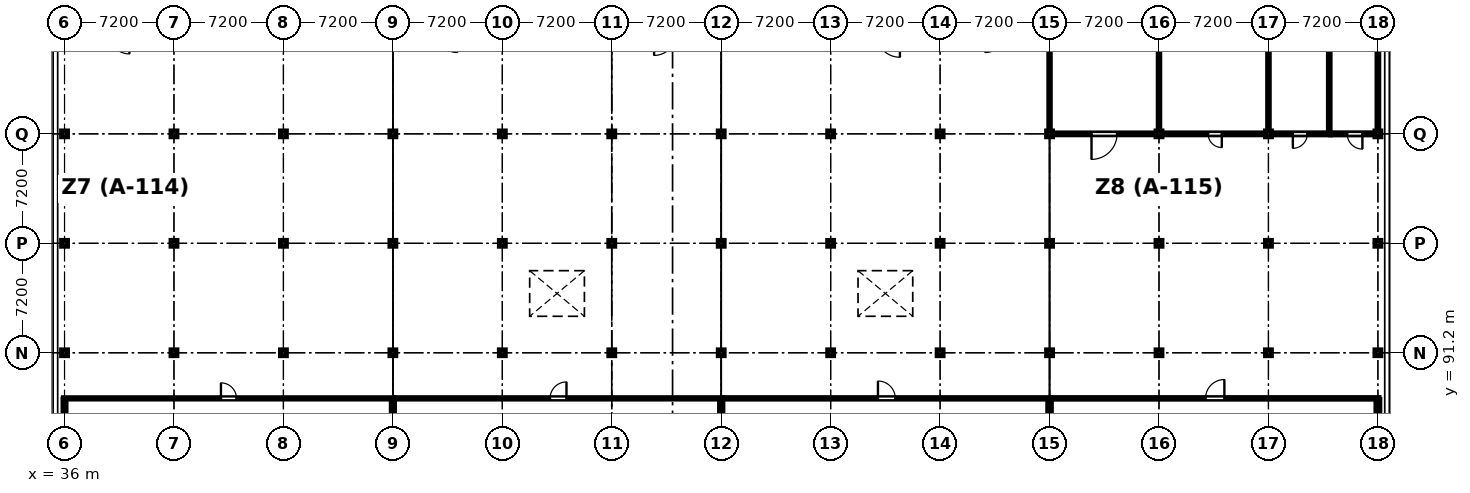
"""IFC4 building model, lengths in metres.
Left out: names, types, materials, properties, quantities, classifications, styles, units other than length and angle.
Written with IfcOpenShell. Run it as: python <this file> out.ifc"""

import sys

from ifc_helpers import new_model, si_unit, direction, frame, frame_2d, origin, origin_2d, place, context, subcontext, project, spatial, rectangle, i_section, extrude, element, fill, save


model = new_model("IFC4")
c1 = context("Model", 3, precision=1e-05, world=origin(), true_north=direction((0.0, 1.0)))
c2 = subcontext(c1, "Body", "Model", "MODEL_VIEW")
j1 = project(units=[si_unit("LENGTHUNIT", "METRE"), si_unit("PLANEANGLEUNIT", "RADIAN")], contexts=[c1])
p1 = place(None, origin())
s1 = spatial("IfcSite", under=j1, at=p1, CompositionType="ELEMENT")
p2 = place(p1, origin())
s2 = spatial("IfcBuilding", under=s1, at=p2, CompositionType="ELEMENT")
p3 = place(p2, origin())
s3 = spatial("IfcBuildingStorey", under=s2, at=p3, CompositionType="ELEMENT", Elevation=0.0)
for number, where, z_axis, x_axis in (
    (1, (36.0, 91.2, 0.0), (0.0, 0.0, 1.0), (1.0, 0.0, 0.0)),
    (2, (36.0, 98.4, 0.0), (0.0, 0.0, 1.0), (1.0, 0.0, 0.0)),
    (3, (36.0, 105.6, 0.0), (0.0, 0.0, 1.0), (1.0, 0.0, 0.0)),
    (4, (43.2, 91.2, 0.0), (0.0, 0.0, 1.0), (1.0, 0.0, 0.0)),
    (5, (43.2, 98.4, 0.0), (0.0, 0.0, 1.0), (1.0, 0.0, 0.0)),
    (6, (43.2, 105.6, 0.0), (0.0, 0.0, 1.0), (1.0, 0.0, 0.0)),
    (7, (50.4, 91.2, 0.0), (0.0, 0.0, 1.0), (1.0, 0.0, 0.0)),
    (8, (50.4, 98.4, 0.0), (0.0, 0.0, 1.0), (1.0, 0.0, 0.0)),
    (9, (50.4, 105.6, 0.0), (0.0, 0.0, 1.0), (1.0, 0.0, 0.0)),
    (10, (57.6, 91.2, 0.0), (0.0, 0.0, 1.0), (1.0, 0.0, 0.0)),
    (11, (57.6, 98.4, 0.0), (0.0, 0.0, 1.0), (1.0, 0.0, 0.0)),
    (12, (57.6, 105.6, 0.0), (0.0, 0.0, 1.0), (1.0, 0.0, 0.0)),
    (13, (64.8, 91.2, 0.0), (0.0, 0.0, 1.0), (1.0, 0.0, 0.0)),
    (14, (64.8, 98.4, 0.0), (0.0, 0.0, 1.0), (1.0, 0.0, 0.0)),
    (15, (64.8, 105.6, 0.0), (0.0, 0.0, 1.0), (1.0, 0.0, 0.0)),
    (16, (72.0, 91.2, 0.0), (0.0, 0.0, 1.0), (1.0, 0.0, 0.0)),
    (17, (72.0, 98.4, 0.0), (0.0, 0.0, 1.0), (1.0, 0.0, 0.0)),
    (18, (72.0, 105.6, 0.0), (0.0, 0.0, 1.0), (1.0, 0.0, 0.0)),
    (19, (79.2, 91.2, 0.0), (0.0, 0.0, 1.0), (1.0, 0.0, 0.0)),
    (20, (79.2, 98.4, 0.0), (0.0, 0.0, 1.0), (1.0, 0.0, 0.0)),
    (21, (79.2, 105.6, 0.0), (0.0, 0.0, 1.0), (1.0, 0.0, 0.0)),
    (22, (86.4, 91.2, 0.0), (0.0, 0.0, 1.0), (1.0, 0.0, 0.0)),
    (23, (86.4, 98.4, 0.0), (0.0, 0.0, 1.0), (1.0, 0.0, 0.0)),
    (24, (86.4, 105.6, 0.0), (0.0, 0.0, 1.0), (1.0, 0.0, 0.0)),
    (25, (93.6, 91.2, 0.0), (0.0, 0.0, 1.0), (1.0, 0.0, 0.0)),
    (26, (93.6, 98.4, 0.0), (0.0, 0.0, 1.0), (1.0, 0.0, 0.0)),
    (27, (93.6, 105.6, 0.0), (0.0, 0.0, 1.0), (1.0, 0.0, 0.0)),
    (28, (100.8, 91.2, 0.0), (0.0, 0.0, 1.0), (1.0, 0.0, 0.0)),
    (29, (100.8, 98.4, 0.0), (0.0, 0.0, 1.0), (1.0, 0.0, 0.0)),
    (30, (100.8, 105.6, 0.0), (0.0, 0.0, 1.0), (1.0, 0.0, 0.0)),
    (31, (108.0, 91.2, 0.0), (0.0, 0.0, 1.0), (1.0, 0.0, 0.0)),
    (32, (108.0, 98.4, 0.0), (0.0, 0.0, 1.0), (1.0, 0.0, 0.0)),
    (33, (108.0, 105.6, 0.0), (0.0, 0.0, 1.0), (1.0, 0.0, 0.0)),
    (34, (115.2, 91.2, 0.0), (0.0, 0.0, 1.0), (1.0, 0.0, 0.0)),
    (35, (115.2, 98.4, 0.0), (0.0, 0.0, 1.0), (1.0, 0.0, 0.0)),
    (36, (115.2, 105.6, 0.0), (0.0, 0.0, 1.0), (1.0, 0.0, 0.0)),
    (37, (122.4, 91.2, 0.0), (0.0, 0.0, 1.0), (1.0, 0.0, 0.0)),
    (38, (122.4, 98.4, 0.0), (0.0, 0.0, 1.0), (1.0, 0.0, 0.0)),
    (39, (122.4, 105.6, 0.0), (0.0, 0.0, 1.0), (1.0, 0.0, 0.0)),
):
    element("IfcColumn", number, at=place(p3, frame(where, z_axis=z_axis, x_axis=x_axis)), inside=s3, PredefinedType="COLUMN", context=c2, shape_type="SweptSolid", body=[
        extrude(i_section(OverallWidth=0.399, OverallDepth=0.394, WebThickness=0.023, FlangeThickness=0.037, FilletRadius=0.015, at=origin_2d()), origin(), (0.0, 0.0, 1.0), 5.4),
    ])
p4 = place(p3, frame((35.92, 88.2, 0.0), z_axis=(0.0, 0.0, 1.0), x_axis=(1.0, 0.0, 0.0)))
e40 = element("IfcWall", 40, at=p4, inside=s3, PredefinedType="PARTITIONING", context=c2, shape_type="SweptSolid", body=[
    extrude(rectangle(XDim=21.76, YDim=0.1, at=frame_2d((10.88, 0.0))), origin(), (0.0, 0.0, 1.0), 4.457),
])
p5 = place(p4, frame((10.37, 0.0, 0.0)))
e41 = element("IfcOpeningElement", 41, at=p5, cuts=e40, PredefinedType="OPENING", context=c2, shape_type="SweptSolid", body=[
    extrude(rectangle(XDim=1.02, YDim=2.16, at=frame_2d((0.51, 1.08))), frame((0.0, 0.06, 0.0), z_axis=(0.0, -1.0, 0.0), x_axis=(1.0, 0.0, 0.0)), (0.0, 0.0, 1.0), 0.12),
])
p6 = place(p4, frame((12.64, 0.0, 0.95)))
e42 = element("IfcOpeningElement", 42, at=p6, cuts=e40, PredefinedType="OPENING", context=c2, shape_type="SweptSolid", body=[
    extrude(rectangle(XDim=1.6, YDim=1.0, at=frame_2d((0.8, 0.5))), frame((0.0, 0.06, 0.0), z_axis=(0.0, -1.0, 0.0), x_axis=(1.0, 0.0, 0.0)), (0.0, 0.0, 1.0), 0.12),
])
p7 = place(p3, frame((57.682, 88.2, 0.0), z_axis=(0.0, 0.0, 1.0), x_axis=(1.0, 0.0, 0.0)))
e43 = element("IfcWall", 43, at=p7, inside=s3, PredefinedType="PARTITIONING", context=c2, shape_type="SweptSolid", body=[
    extrude(rectangle(XDim=21.598, YDim=0.105, at=frame_2d((10.799, 0.0))), origin(), (0.0, 0.0, 1.0), 4.457),
])
p8 = place(p7, frame((10.259, 0.0, 0.0)))
e44 = element("IfcOpeningElement", 44, at=p8, cuts=e43, PredefinedType="OPENING", context=c2, shape_type="SweptSolid", body=[
    extrude(rectangle(XDim=1.08, YDim=2.16, at=frame_2d((0.54, 1.08))), frame((0.0, 0.062, 0.0), z_axis=(0.0, -1.0, 0.0), x_axis=(1.0, 0.0, 0.0)), (0.0, 0.0, 1.0), 0.125),
])
p9 = place(p7, frame((12.589, 0.0, 0.95)))
e45 = element("IfcOpeningElement", 45, at=p9, cuts=e43, PredefinedType="OPENING", context=c2, shape_type="SweptSolid", body=[
    extrude(rectangle(XDim=1.0, YDim=1.15, at=frame_2d((0.5, 0.575))), frame((0.0, 0.062, 0.0), z_axis=(0.0, -1.0, 0.0), x_axis=(1.0, 0.0, 0.0)), (0.0, 0.0, 1.0), 0.125),
])
p10 = place(p3, frame((79.282, 88.2, 0.0), z_axis=(0.0, 0.0, 1.0), x_axis=(1.0, 0.0, 0.0)))
e46 = element("IfcWall", 46, at=p10, inside=s3, PredefinedType="PARTITIONING", context=c2, shape_type="SweptSolid", body=[
    extrude(rectangle(XDim=21.598, YDim=0.11, at=frame_2d((10.799, 0.0))), origin(), (0.0, 0.0, 1.0), 4.457),
])
p11 = place(p10, frame((10.229, 0.0, 0.0)))
e47 = element("IfcOpeningElement", 47, at=p11, cuts=e46, PredefinedType="OPENING", context=c2, shape_type="SweptSolid", body=[
    extrude(rectangle(XDim=1.14, YDim=2.16, at=frame_2d((0.57, 1.08))), frame((0.0, 0.065, 0.0), z_axis=(0.0, -1.0, 0.0), x_axis=(1.0, 0.0, 0.0)), (0.0, 0.0, 1.0), 0.13),
])
p12 = place(p10, frame((12.619, 0.0, 0.95)))
e48 = element("IfcOpeningElement", 48, at=p12, cuts=e46, PredefinedType="OPENING", context=c2, shape_type="SweptSolid", body=[
    extrude(rectangle(XDim=1.25, YDim=1.15, at=frame_2d((0.625, 0.575))), frame((0.0, 0.065, 0.0), z_axis=(0.0, -1.0, 0.0), x_axis=(1.0, 0.0, 0.0)), (0.0, 0.0, 1.0), 0.13),
])
p13 = place(p3, frame((100.882, 88.2, 0.0), z_axis=(0.0, 0.0, 1.0), x_axis=(1.0, 0.0, 0.0)))
e49 = element("IfcWall", 49, at=p13, inside=s3, PredefinedType="PARTITIONING", context=c2, shape_type="SweptSolid", body=[
    extrude(rectangle(XDim=21.598, YDim=0.115, at=frame_2d((10.799, 0.0))), origin(), (0.0, 0.0, 1.0), 4.457),
])
p14 = place(p13, frame((10.179, 0.0, 0.0)))
e50 = element("IfcOpeningElement", 50, at=p14, cuts=e49, PredefinedType="OPENING", context=c2, shape_type="SweptSolid", body=[
    extrude(rectangle(XDim=1.24, YDim=2.16, at=frame_2d((0.62, 1.08))), frame((0.0, 0.067, 0.0), z_axis=(0.0, -1.0, 0.0), x_axis=(1.0, 0.0, 0.0)), (0.0, 0.0, 1.0), 0.135),
])
p15 = place(p13, frame((12.669, 0.0, 0.95)))
e51 = element("IfcOpeningElement", 51, at=p15, cuts=e49, PredefinedType="OPENING", context=c2, shape_type="SweptSolid", body=[
    extrude(rectangle(XDim=1.5, YDim=1.15, at=frame_2d((0.75, 0.575))), frame((0.0, 0.067, 0.0), z_axis=(0.0, -1.0, 0.0), x_axis=(1.0, 0.0, 0.0)), (0.0, 0.0, 1.0), 0.135),
])
p16 = place(p3, frame((108.08, 105.6, 0.0), z_axis=(0.0, 0.0, 1.0), x_axis=(-1.0, 0.0, 0.0)))
e52 = element("IfcWall", 52, at=p16, inside=s3, PredefinedType="PARTITIONING", context=c2, shape_type="SweptSolid", body=[
    extrude(rectangle(XDim=7.36, YDim=0.135, at=frame_2d((3.68, 0.0))), origin(), (0.0, 0.0, 1.0), 4.457),
])
p17 = place(p16, frame((2.84, 0.0, 0.0)))
e53 = element("IfcOpeningElement", 53, at=p17, cuts=e52, PredefinedType="OPENING", context=c2, shape_type="SweptSolid", body=[
    extrude(rectangle(XDim=1.68, YDim=2.16, at=frame_2d((0.84, 1.08))), frame((0.0, 0.077, 0.0), z_axis=(0.0, -1.0, 0.0), x_axis=(1.0, 0.0, 0.0)), (0.0, 0.0, 1.0), 0.155),
])
p18 = place(p3, frame((115.28, 105.6, 0.0), z_axis=(0.0, 0.0, 1.0), x_axis=(-1.0, 0.0, 0.0)))
e54 = element("IfcWall", 54, at=p18, inside=s3, PredefinedType="PARTITIONING", context=c2, shape_type="SweptSolid", body=[
    extrude(rectangle(XDim=7.198, YDim=0.14, at=frame_2d((3.599, 0.0))), origin(), (0.0, 0.0, 1.0), 4.457),
])
p19 = place(p18, frame((3.149, 0.0, 0.0)))
e55 = element("IfcOpeningElement", 55, at=p19, cuts=e54, PredefinedType="OPENING", context=c2, shape_type="SweptSolid", body=[
    extrude(rectangle(XDim=0.9, YDim=2.22, at=frame_2d((0.45, 1.11))), frame((0.0, 0.08, 0.0), z_axis=(0.0, -1.0, 0.0), x_axis=(1.0, 0.0, 0.0)), (0.0, 0.0, 1.0), 0.16),
])
p20 = place(p3, frame((119.28, 105.6, 0.0), z_axis=(0.0, 0.0, 1.0), x_axis=(-1.0, 0.0, 0.0)))
e56 = element("IfcWall", 56, at=p20, inside=s3, PredefinedType="PARTITIONING", context=c2, shape_type="SweptSolid", body=[
    extrude(rectangle(XDim=3.998, YDim=0.145, at=frame_2d((1.999, 0.0))), origin(), (0.0, 0.0, 1.0), 4.457),
])
p21 = place(p20, frame((1.524, 0.0, 0.0)))
e57 = element("IfcOpeningElement", 57, at=p21, cuts=e56, PredefinedType="OPENING", context=c2, shape_type="SweptSolid", body=[
    extrude(rectangle(XDim=0.95, YDim=2.22, at=frame_2d((0.475, 1.11))), frame((0.0, 0.083, 0.0), z_axis=(0.0, -1.0, 0.0), x_axis=(1.0, 0.0, 0.0)), (0.0, 0.0, 1.0), 0.165),
])
p22 = place(p3, frame((122.48, 105.6, 0.0), z_axis=(0.0, 0.0, 1.0), x_axis=(-1.0, 0.0, 0.0)))
e58 = element("IfcWall", 58, at=p22, inside=s3, PredefinedType="PARTITIONING", context=c2, shape_type="SweptSolid", body=[
    extrude(rectangle(XDim=3.198, YDim=0.15, at=frame_2d((1.599, 0.0))), origin(), (0.0, 0.0, 1.0), 4.457),
])
p23 = place(p22, frame((1.099, 0.0, 0.0)))
e59 = element("IfcOpeningElement", 59, at=p23, cuts=e58, PredefinedType="OPENING", context=c2, shape_type="SweptSolid", body=[
    extrude(rectangle(XDim=1.0, YDim=2.22, at=frame_2d((0.5, 1.11))), frame((0.0, 0.085, 0.0), z_axis=(0.0, -1.0, 0.0), x_axis=(1.0, 0.0, 0.0)), (0.0, 0.0, 1.0), 0.17),
])
p24 = place(p3, frame((36.0, 76.942, 0.0), z_axis=(0.0, 0.0, 1.0), x_axis=(0.0, 1.0, 0.0)))
e60 = element("IfcWall", 60, at=p24, inside=s3, PredefinedType="PARTITIONING", context=c2, shape_type="SweptSolid", body=[
    extrude(rectangle(XDim=11.206, YDim=0.212, at=frame_2d((5.603, 0.0))), origin(), (0.0, 0.0, 1.0), 4.457),
])
p25 = place(p3, frame((57.6, 88.146, 0.0), z_axis=(0.0, 0.0, 1.0), x_axis=(0.0, -1.0, 0.0)))
e61 = element("IfcWall", 61, at=p25, inside=s3, PredefinedType="PARTITIONING", context=c2, shape_type="SweptSolid", body=[
    extrude(rectangle(XDim=11.204, YDim=0.225, at=frame_2d((5.602, 0.0))), origin(), (0.0, 0.0, 1.0), 4.457),
])
p26 = place(p3, frame((79.2, 88.143, 0.0), z_axis=(0.0, 0.0, 1.0), x_axis=(0.0, -1.0, 0.0)))
e62 = element("IfcWall", 62, at=p26, inside=s3, PredefinedType="PARTITIONING", context=c2, shape_type="SweptSolid", body=[
    extrude(rectangle(XDim=11.201, YDim=0.235, at=frame_2d((5.601, 0.0))), origin(), (0.0, 0.0, 1.0), 4.457),
])
p27 = place(p3, frame((100.8, 88.14, 0.0), z_axis=(0.0, 0.0, 1.0), x_axis=(0.0, -1.0, 0.0)))
e63 = element("IfcWall", 63, at=p27, inside=s3, PredefinedType="PARTITIONING", context=c2, shape_type="SweptSolid", body=[
    extrude(rectangle(XDim=11.198, YDim=0.25, at=frame_2d((5.599, 0.0))), origin(), (0.0, 0.0, 1.0), 4.457),
])
p28 = place(p3, frame((122.4, 88.14, 0.0), z_axis=(0.0, 0.0, 1.0), x_axis=(0.0, -1.0, 0.0)))
e64 = element("IfcWall", 64, at=p28, inside=s3, PredefinedType="PARTITIONING", context=c2, shape_type="SweptSolid", body=[
    extrude(rectangle(XDim=11.198, YDim=0.27, at=frame_2d((5.599, 0.0))), origin(), (0.0, 0.0, 1.0), 4.457),
])
p29 = place(p3, frame((100.8, 105.67, 0.0), z_axis=(0.0, 0.0, 1.0), x_axis=(0.0, 1.0, 0.0)))
e65 = element("IfcWall", 65, at=p29, inside=s3, PredefinedType="PARTITIONING", context=c2, shape_type="SweptSolid", body=[
    extrude(rectangle(XDim=6.446, YDim=0.11, at=frame_2d((3.223, 0.0))), origin(), (0.0, 0.0, 1.0), 4.457),
])
p30 = place(p3, frame((108.0, 112.113, 0.0), z_axis=(0.0, 0.0, 1.0), x_axis=(0.0, -1.0, 0.0)))
e66 = element("IfcWall", 66, at=p30, inside=s3, PredefinedType="PARTITIONING", context=c2, shape_type="SweptSolid", body=[
    extrude(rectangle(XDim=6.441, YDim=0.115, at=frame_2d((3.22, 0.0))), origin(), (0.0, 0.0, 1.0), 4.457),
])
p31 = place(p3, frame((115.2, 112.109, 0.0), z_axis=(0.0, 0.0, 1.0), x_axis=(0.0, -1.0, 0.0)))
e67 = element("IfcWall", 67, at=p31, inside=s3, PredefinedType="PARTITIONING", context=c2, shape_type="SweptSolid", body=[
    extrude(rectangle(XDim=6.435, YDim=0.12, at=frame_2d((3.217, 0.0))), origin(), (0.0, 0.0, 1.0), 4.457),
])
p32 = place(p3, frame((119.2, 112.106, 0.0), z_axis=(0.0, 0.0, 1.0), x_axis=(0.0, -1.0, 0.0)))
e68 = element("IfcWall", 68, at=p32, inside=s3, PredefinedType="PARTITIONING", context=c2, shape_type="SweptSolid", body=[
    extrude(rectangle(XDim=6.429, YDim=0.125, at=frame_2d((3.214, 0.0))), origin(), (0.0, 0.0, 1.0), 4.457),
])
p33 = place(p3, frame((122.4, 112.106, 0.0), z_axis=(0.0, 0.0, 1.0), x_axis=(0.0, -1.0, 0.0)))
e69 = element("IfcWall", 69, at=p33, inside=s3, PredefinedType="PARTITIONING", context=c2, shape_type="SweptSolid", body=[
    extrude(rectangle(XDim=6.429, YDim=0.13, at=frame_2d((3.214, 0.0))), origin(), (0.0, 0.0, 1.0), 4.457),
])
p34 = place(p5, origin())
e70 = element("IfcDoor", 70, at=p34, inside=s3, OperationType="SINGLE_SWING_LEFT", PredefinedType="DOOR", context=c2, shape_type="SweptSolid", body=[
    extrude(rectangle(XDim=1.02, YDim=2.16, at=frame_2d((0.51, 1.08))), frame((0.0, 0.025, 0.0), z_axis=(0.0, -1.0, 0.0), x_axis=(1.0, 0.0, 0.0)), (0.0, 0.0, 1.0), 0.05),
])
fill(e41, e70)
p35 = place(p6, origin())
e71 = element("IfcWindow", 71, at=p35, inside=s3, PartitioningType="SINGLE_PANEL", PredefinedType="WINDOW", context=c2, shape_type="SweptSolid", body=[
    extrude(rectangle(XDim=1.6, YDim=1.0, at=frame_2d((0.8, 0.5))), frame((0.0, 0.03, 0.0), z_axis=(0.0, -1.0, 0.0), x_axis=(1.0, 0.0, 0.0)), (0.0, 0.0, 1.0), 0.06),
])
fill(e42, e71)
p36 = place(p8, origin())
e72 = element("IfcDoor", 72, at=p36, inside=s3, OperationType="SINGLE_SWING_RIGHT", PredefinedType="DOOR", context=c2, shape_type="SweptSolid", body=[
    extrude(rectangle(XDim=1.08, YDim=2.16, at=frame_2d((0.54, 1.08))), frame((0.0, 0.025, 0.0), z_axis=(0.0, -1.0, 0.0), x_axis=(1.0, 0.0, 0.0)), (0.0, 0.0, 1.0), 0.05),
])
fill(e44, e72)
p37 = place(p9, origin())
e73 = element("IfcWindow", 73, at=p37, inside=s3, PartitioningType="SINGLE_PANEL", PredefinedType="WINDOW", context=c2, shape_type="SweptSolid", body=[
    extrude(rectangle(XDim=1.0, YDim=1.15, at=frame_2d((0.5, 0.575))), frame((0.0, 0.03, 0.0), z_axis=(0.0, -1.0, 0.0), x_axis=(1.0, 0.0, 0.0)), (0.0, 0.0, 1.0), 0.06),
])
fill(e45, e73)
p38 = place(p11, origin())
e74 = element("IfcDoor", 74, at=p38, inside=s3, OperationType="SINGLE_SWING_LEFT", PredefinedType="DOOR", context=c2, shape_type="SweptSolid", body=[
    extrude(rectangle(XDim=1.14, YDim=2.16, at=frame_2d((0.57, 1.08))), frame((0.0, 0.025, 0.0), z_axis=(0.0, -1.0, 0.0), x_axis=(1.0, 0.0, 0.0)), (0.0, 0.0, 1.0), 0.05),
])
fill(e47, e74)
p39 = place(p12, origin())
e75 = element("IfcWindow", 75, at=p39, inside=s3, PartitioningType="SINGLE_PANEL", PredefinedType="WINDOW", context=c2, shape_type="SweptSolid", body=[
    extrude(rectangle(XDim=1.25, YDim=1.15, at=frame_2d((0.625, 0.575))), frame((0.0, 0.03, 0.0), z_axis=(0.0, -1.0, 0.0), x_axis=(1.0, 0.0, 0.0)), (0.0, 0.0, 1.0), 0.06),
])
fill(e48, e75)
p40 = place(p14, origin())
e76 = element("IfcDoor", 76, at=p40, inside=s3, OperationType="SINGLE_SWING_RIGHT", PredefinedType="DOOR", context=c2, shape_type="SweptSolid", body=[
    extrude(rectangle(XDim=1.24, YDim=2.16, at=frame_2d((0.62, 1.08))), frame((0.0, 0.025, 0.0), z_axis=(0.0, -1.0, 0.0), x_axis=(1.0, 0.0, 0.0)), (0.0, 0.0, 1.0), 0.05),
])
fill(e50, e76)
p41 = place(p15, origin())
e77 = element("IfcWindow", 77, at=p41, inside=s3, PartitioningType="SINGLE_PANEL", PredefinedType="WINDOW", context=c2, shape_type="SweptSolid", body=[
    extrude(rectangle(XDim=1.5, YDim=1.15, at=frame_2d((0.75, 0.575))), frame((0.0, 0.03, 0.0), z_axis=(0.0, -1.0, 0.0), x_axis=(1.0, 0.0, 0.0)), (0.0, 0.0, 1.0), 0.06),
])
fill(e51, e77)
p42 = place(p17, origin())
e78 = element("IfcDoor", 78, at=p42, inside=s3, OperationType="SINGLE_SWING_RIGHT", PredefinedType="DOOR", context=c2, shape_type="SweptSolid", body=[
    extrude(rectangle(XDim=1.68, YDim=2.16, at=frame_2d((0.84, 1.08))), frame((0.0, 0.025, 0.0), z_axis=(0.0, -1.0, 0.0), x_axis=(1.0, 0.0, 0.0)), (0.0, 0.0, 1.0), 0.05),
])
fill(e53, e78)
p43 = place(p19, origin())
e79 = element("IfcDoor", 79, at=p43, inside=s3, OperationType="SINGLE_SWING_LEFT", PredefinedType="DOOR", context=c2, shape_type="SweptSolid", body=[
    extrude(rectangle(XDim=0.9, YDim=2.22, at=frame_2d((0.45, 1.11))), frame((0.0, 0.025, 0.0), z_axis=(0.0, -1.0, 0.0), x_axis=(1.0, 0.0, 0.0)), (0.0, 0.0, 1.0), 0.05),
])
fill(e55, e79)
p44 = place(p21, origin())
e80 = element("IfcDoor", 80, at=p44, inside=s3, OperationType="SINGLE_SWING_RIGHT", PredefinedType="DOOR", context=c2, shape_type="SweptSolid", body=[
    extrude(rectangle(XDim=0.95, YDim=2.22, at=frame_2d((0.475, 1.11))), frame((0.0, 0.025, 0.0), z_axis=(0.0, -1.0, 0.0), x_axis=(1.0, 0.0, 0.0)), (0.0, 0.0, 1.0), 0.05),
])
fill(e57, e80)
p45 = place(p23, origin())
e81 = element("IfcDoor", 81, at=p45, inside=s3, OperationType="SINGLE_SWING_LEFT", PredefinedType="DOOR", context=c2, shape_type="SweptSolid", body=[
    extrude(rectangle(XDim=1.0, YDim=2.22, at=frame_2d((0.5, 1.11))), frame((0.0, 0.025, 0.0), z_axis=(0.0, -1.0, 0.0), x_axis=(1.0, 0.0, 0.0)), (0.0, 0.0, 1.0), 0.05),
])
fill(e59, e81)
save(model, sys.argv[1])
